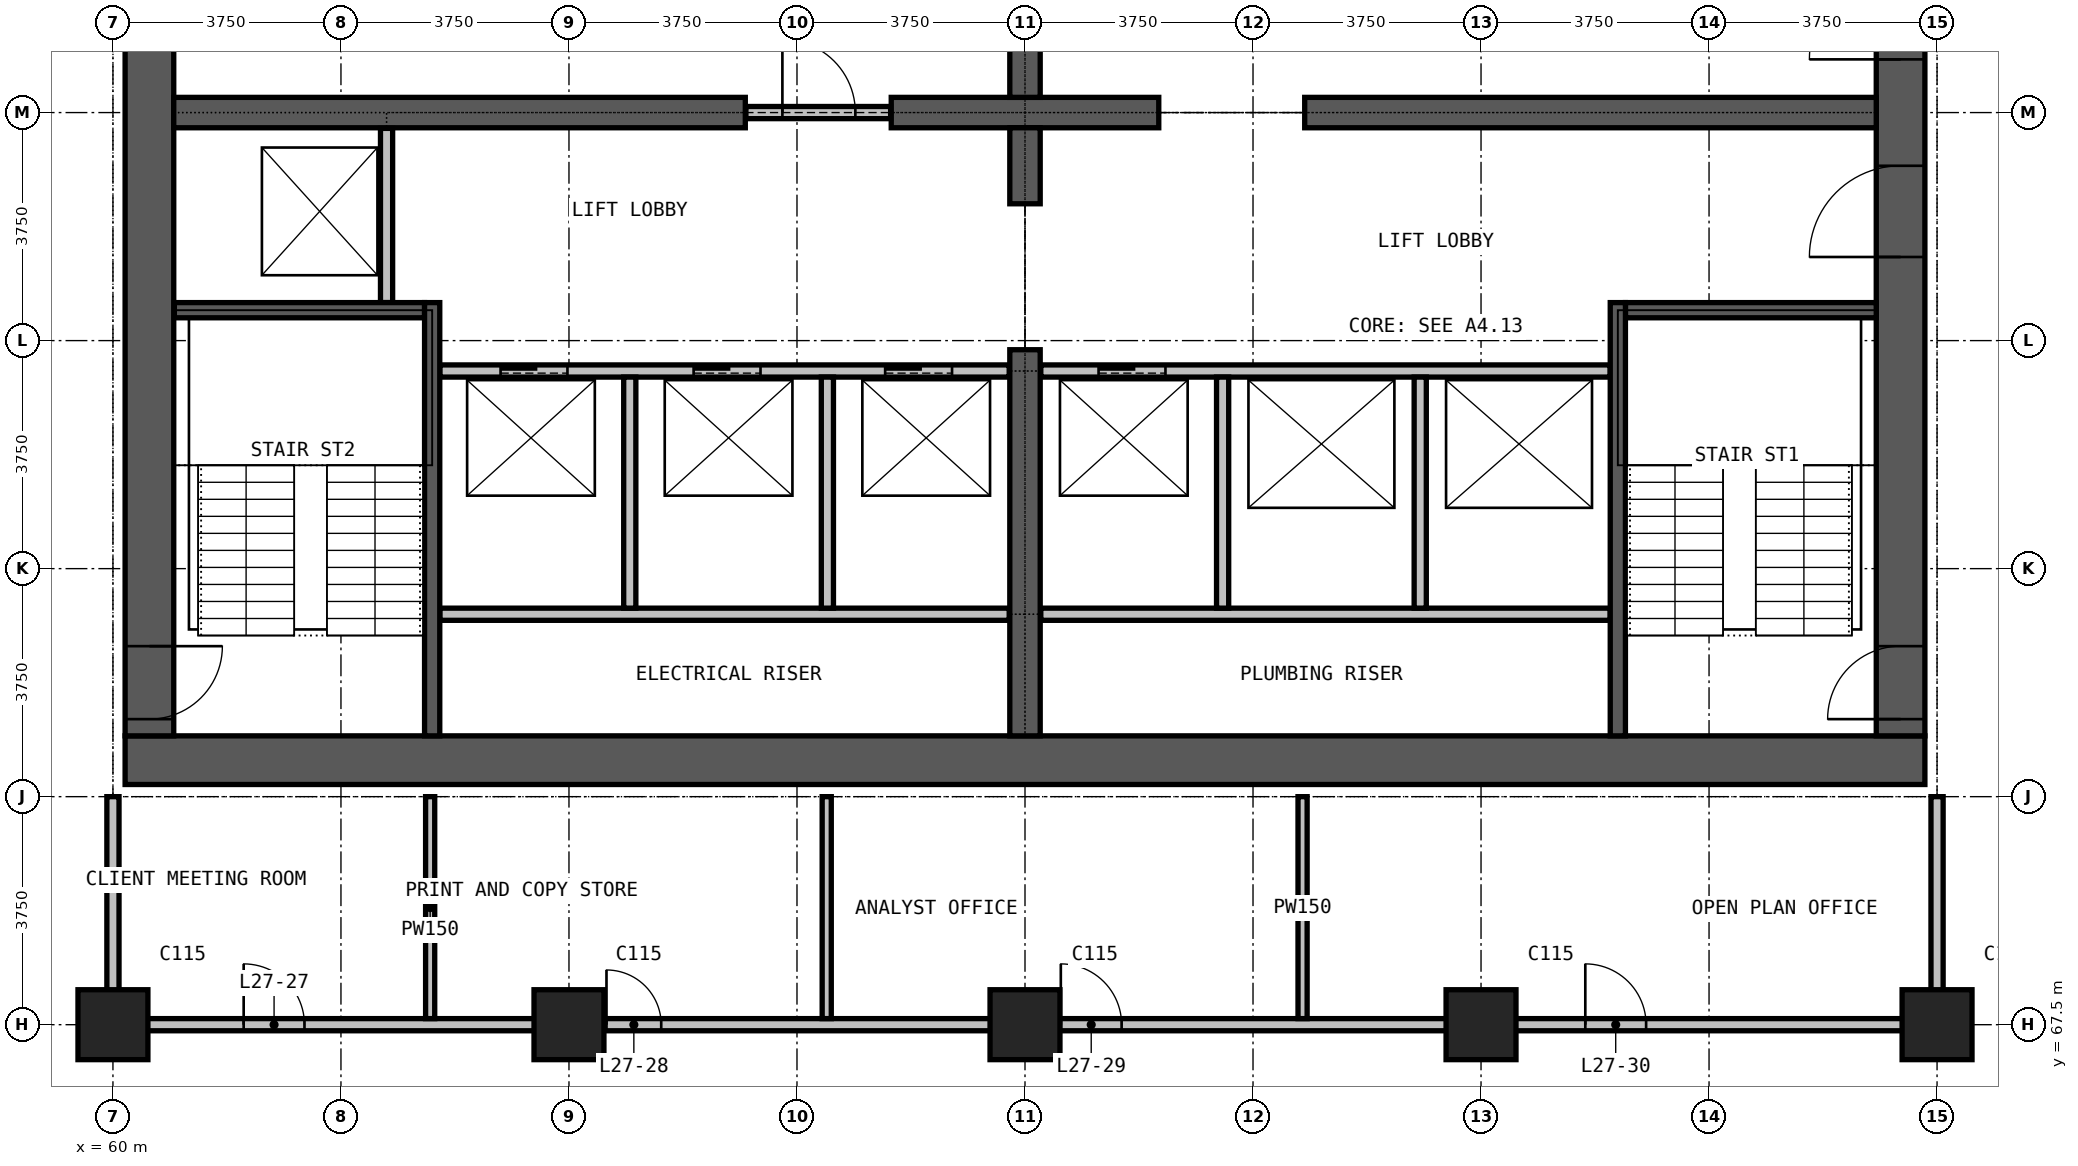
"""IFC4 building model, lengths in metres.
Left out: names, types, materials, properties, quantities, classifications, styles, units other than length and angle.
Written with IfcOpenShell. Run it as: python <this file> out.ifc"""

import sys

from ifc_helpers import new_model, si_unit, direction, frame, frame_2d, origin, origin_2d, place, context, subcontext, project, spatial, rectangle, extrude, element, fill, save


model = new_model("IFC4")
c1 = context("Model", 3, precision=1e-05, world=origin(), true_north=direction((0.0, 1.0)))
c2 = subcontext(c1, "Body", "Model", "MODEL_VIEW")
j1 = project(units=[si_unit("LENGTHUNIT", "METRE"), si_unit("PLANEANGLEUNIT", "RADIAN")], contexts=[c1])
p1 = place(None, origin())
s1 = spatial("IfcSite", under=j1, at=p1, CompositionType="ELEMENT")
p2 = place(p1, origin())
s2 = spatial("IfcBuilding", under=s1, at=p2, CompositionType="ELEMENT")
p3 = place(p2, frame((0.0, 0.0, 110.8)))
s3 = spatial("IfcBuildingStorey", under=s2, at=p3, CompositionType="ELEMENT", Elevation=110.8)
for number, where, z_axis, x_axis in (
    (1, (60.0, 67.5, 0.0), (0.0, 0.0, 1.0), (1.0, 0.0, 0.0)),
    (2, (67.5, 67.5, 0.0), (0.0, 0.0, 1.0), (1.0, 0.0, 0.0)),
    (3, (75.0, 67.5, 0.0), (0.0, 0.0, 1.0), (1.0, 0.0, 0.0)),
    (4, (82.5, 67.5, 0.0), (0.0, 0.0, 1.0), (1.0, 0.0, 0.0)),
    (5, (90.0, 67.5, 0.0), (0.0, 0.0, 1.0), (1.0, 0.0, 0.0)),
):
    element("IfcColumn", number, at=place(p3, frame(where, z_axis=z_axis, x_axis=x_axis)), inside=s3, PredefinedType="COLUMN", context=c2, shape_type="SweptSolid", body=[
        extrude(rectangle(XDim=1.15, YDim=1.15, at=origin_2d()), origin(), (0.0, 0.0, 1.0), 3.6),
    ])
p4 = place(p3, frame((60.2, 71.85, 0.0), z_axis=(0.0, 0.0, 1.0), x_axis=(1.0, 0.0, 0.0)))
e6 = element("IfcWall", 6, at=p4, inside=s3, PredefinedType="SHEAR", context=c2, shape_type="SweptSolid", body=[
    extrude(rectangle(XDim=29.6, YDim=0.8, at=frame_2d((14.8, 0.0))), origin(), (0.0, 0.0, 1.0), 3.6),
])
p5 = place(p3, frame((89.4, 72.25, 0.0), z_axis=(0.0, 0.0, 1.0), x_axis=(0.0, 1.0, 0.0)))
e7 = element("IfcWall", 7, at=p5, inside=s3, PredefinedType="SHEAR", context=c2, shape_type="SweptSolid", body=[
    extrude(rectangle(XDim=20.5, YDim=0.8, at=frame_2d((10.25, 0.0))), origin(), (0.0, 0.0, 1.0), 3.6),
])
p6 = place(p5, frame((0.275, 0.0, 0.0)))
e8 = element("IfcOpeningElement", 8, at=p6, cuts=e7, PredefinedType="OPENING", context=c2, shape_type="SweptSolid", body=[
    extrude(rectangle(XDim=1.2, YDim=2.2, at=frame_2d((0.6, 1.1))), frame((0.0, 0.41, 0.0), z_axis=(0.0, -1.0, 0.0), x_axis=(1.0, 0.0, 0.0)), (0.0, 0.0, 1.0), 0.82),
])
p7 = place(p5, frame((13.775, 0.0, 0.0)))
e9 = element("IfcOpeningElement", 9, at=p7, cuts=e7, PredefinedType="OPENING", context=c2, shape_type="SweptSolid", body=[
    extrude(rectangle(XDim=1.2, YDim=2.2, at=frame_2d((0.6, 1.1))), frame((0.0, 0.41, 0.0), z_axis=(0.0, -1.0, 0.0), x_axis=(1.0, 0.0, 0.0)), (0.0, 0.0, 1.0), 0.82),
])
p8 = place(p5, frame((7.875, 0.0, 0.0)))
e10 = element("IfcOpeningElement", 10, at=p8, cuts=e7, PredefinedType="OPENING", context=c2, shape_type="SweptSolid", body=[
    extrude(rectangle(XDim=1.5, YDim=2.2, at=frame_2d((0.75, 1.1))), frame((0.0, 0.41, 0.0), z_axis=(0.0, -1.0, 0.0), x_axis=(1.0, 0.0, 0.0)), (0.0, 0.0, 1.0), 0.82),
])
p9 = place(p5, frame((11.125, 0.0, 0.0)))
e11 = element("IfcOpeningElement", 11, at=p9, cuts=e7, PredefinedType="OPENING", context=c2, shape_type="SweptSolid", body=[
    extrude(rectangle(XDim=1.5, YDim=2.2, at=frame_2d((0.75, 1.1))), frame((0.0, 0.41, 0.0), z_axis=(0.0, -1.0, 0.0), x_axis=(1.0, 0.0, 0.0)), (0.0, 0.0, 1.0), 0.82),
])
p10 = place(p3, frame((60.6, 92.75, 0.0), z_axis=(0.0, 0.0, 1.0), x_axis=(0.0, -1.0, 0.0)))
e12 = element("IfcWall", 12, at=p10, inside=s3, PredefinedType="SHEAR", context=c2, shape_type="SweptSolid", body=[
    extrude(rectangle(XDim=20.5, YDim=0.8, at=frame_2d((10.25, 0.0))), origin(), (0.0, 0.0, 1.0), 3.6),
])
p11 = place(p10, frame((19.025, 0.0, 0.0)))
e13 = element("IfcOpeningElement", 13, at=p11, cuts=e12, PredefinedType="OPENING", context=c2, shape_type="SweptSolid", body=[
    extrude(rectangle(XDim=1.2, YDim=2.2, at=frame_2d((0.6, 1.1))), frame((0.0, 0.41, 0.0), z_axis=(0.0, -1.0, 0.0), x_axis=(1.0, 0.0, 0.0)), (0.0, 0.0, 1.0), 0.82),
])
p12 = place(p10, frame((8.025, 0.0, 0.0)))
e14 = element("IfcOpeningElement", 14, at=p12, cuts=e12, PredefinedType="OPENING", context=c2, shape_type="SweptSolid", body=[
    extrude(rectangle(XDim=1.2, YDim=2.2, at=frame_2d((0.6, 1.1))), frame((0.0, 0.41, 0.0), z_axis=(0.0, -1.0, 0.0), x_axis=(1.0, 0.0, 0.0)), (0.0, 0.0, 1.0), 0.82),
])
p13 = place(p3, frame((61.0, 82.5, 0.0), z_axis=(0.0, 0.0, 1.0), x_axis=(1.0, 0.0, 0.0)))
e15 = element("IfcWall", 15, at=p13, inside=s3, PredefinedType="SHEAR", context=c2, shape_type="SweptSolid", body=[
    extrude(rectangle(XDim=9.4, YDim=0.5, at=frame_2d((4.7, 0.0))), origin(), (0.0, 0.0, 1.0), 3.6),
])
p14 = place(p3, frame((72.8, 82.5, 0.0), z_axis=(0.0, 0.0, 1.0), x_axis=(1.0, 0.0, 0.0)))
e16 = element("IfcWall", 16, at=p14, inside=s3, PredefinedType="SHEAR", context=c2, shape_type="SweptSolid", body=[
    extrude(rectangle(XDim=4.4, YDim=0.5, at=frame_2d((2.2, 0.0))), origin(), (0.0, 0.0, 1.0), 3.6),
])
p15 = place(p3, frame((79.6, 82.5, 0.0), z_axis=(0.0, 0.0, 1.0), x_axis=(1.0, 0.0, 0.0)))
e17 = element("IfcWall", 17, at=p15, inside=s3, PredefinedType="SHEAR", context=c2, shape_type="SweptSolid", body=[
    extrude(rectangle(XDim=9.4, YDim=0.5, at=frame_2d((4.7, 0.0))), origin(), (0.0, 0.0, 1.0), 3.6),
])
p16 = place(p3, frame((75.0, 72.25, 0.0), z_axis=(0.0, 0.0, 1.0), x_axis=(0.0, 1.0, 0.0)))
e18 = element("IfcWall", 18, at=p16, inside=s3, PredefinedType="SHEAR", context=c2, shape_type="SweptSolid", body=[
    extrude(rectangle(XDim=6.35, YDim=0.5, at=frame_2d((3.175, 0.0))), origin(), (0.0, 0.0, 1.0), 3.6),
])
for number, where, z_axis, x_axis in (
    (19, (75.0, 81.0, 0.0), (0.0, 0.0, 1.0), (0.0, 1.0, 0.0)),
    (20, (75.0, 82.75, 0.0), (0.0, 0.0, 1.0), (0.0, 1.0, 0.0)),
):
    element("IfcWall", number, at=place(p3, frame(where, z_axis=z_axis, x_axis=x_axis)), inside=s3, PredefinedType="SHEAR", context=c2, shape_type="SweptSolid", body=[
        extrude(rectangle(XDim=1.25, YDim=0.5, at=frame_2d((0.625, 0.0))), origin(), (0.0, 0.0, 1.0), 3.6),
    ])
p17 = place(p3, frame((70.41, 82.5, 0.0), z_axis=(0.0, 0.0, 1.0), x_axis=(1.0, 0.0, 0.0)))
e21 = element("IfcWall", 21, at=p17, inside=s3, PredefinedType="PARTITIONING", context=c2, shape_type="SweptSolid", body=[
    extrude(rectangle(XDim=2.38, YDim=0.2, at=frame_2d((1.19, 0.0))), origin(), (0.0, 0.0, 1.0), 2.4),
])
p18 = place(p17, frame((0.6, 0.0, 0.0)))
e22 = element("IfcOpeningElement", 22, at=p18, cuts=e21, PredefinedType="OPENING", context=c2, shape_type="SweptSolid", body=[
    extrude(rectangle(XDim=1.2, YDim=2.2, at=frame_2d((0.6, 1.1))), frame((0.0, 0.11, 0.0), z_axis=(0.0, -1.0, 0.0), x_axis=(1.0, 0.0, 0.0)), (0.0, 0.0, 1.0), 0.22),
])
p19 = place(p3, frame((60.1, 67.5, 0.0), z_axis=(0.0, 0.0, 1.0), x_axis=(1.0, 0.0, 0.0)))
e23 = element("IfcWall", 23, at=p19, inside=s3, PredefinedType="PARTITIONING", context=c2, shape_type="SweptSolid", body=[
    extrude(rectangle(XDim=29.8, YDim=0.2, at=frame_2d((14.9, 0.0))), origin(), (0.0, 0.0, 1.0), 3.3),
])
p20 = place(p19, frame((2.05, 0.0, 0.0)))
e24 = element("IfcOpeningElement", 24, at=p20, cuts=e23, PredefinedType="OPENING", context=c2, shape_type="SweptSolid", body=[
    extrude(rectangle(XDim=1.0, YDim=2.2, at=frame_2d((0.5, 1.1))), frame((0.0, 0.11, 0.0), z_axis=(0.0, -1.0, 0.0), x_axis=(1.0, 0.0, 0.0)), (0.0, 0.0, 1.0), 0.22),
])
p21 = place(p19, frame((8.017, 0.0, 0.0)))
e25 = element("IfcOpeningElement", 25, at=p21, cuts=e23, PredefinedType="OPENING", context=c2, shape_type="SweptSolid", body=[
    extrude(rectangle(XDim=0.9, YDim=2.2, at=frame_2d((0.45, 1.1))), frame((0.0, 0.11, 0.0), z_axis=(0.0, -1.0, 0.0), x_axis=(1.0, 0.0, 0.0)), (0.0, 0.0, 1.0), 0.22),
])
p22 = place(p19, frame((15.489, 0.0, 0.0)))
e26 = element("IfcOpeningElement", 26, at=p22, cuts=e23, PredefinedType="OPENING", context=c2, shape_type="SweptSolid", body=[
    extrude(rectangle(XDim=1.0, YDim=2.2, at=frame_2d((0.5, 1.1))), frame((0.0, 0.11, 0.0), z_axis=(0.0, -1.0, 0.0), x_axis=(1.0, 0.0, 0.0)), (0.0, 0.0, 1.0), 0.22),
])
p23 = place(p19, frame((24.115, 0.0, 0.0)))
e27 = element("IfcOpeningElement", 27, at=p23, cuts=e23, PredefinedType="OPENING", context=c2, shape_type="SweptSolid", body=[
    extrude(rectangle(XDim=1.0, YDim=2.2, at=frame_2d((0.5, 1.1))), frame((0.0, 0.11, 0.0), z_axis=(0.0, -1.0, 0.0), x_axis=(1.0, 0.0, 0.0)), (0.0, 0.0, 1.0), 0.22),
])
for number, where, z_axis, x_axis in (
    (28, (60.0, 67.4, 0.0), (0.0, 0.0, 1.0), (0.0, 1.0, 0.0)),
    (29, (90.0, 67.4, 0.0), (0.0, 0.0, 1.0), (0.0, 1.0, 0.0)),
):
    element("IfcWall", number, at=place(p3, frame(where, z_axis=z_axis, x_axis=x_axis)), inside=s3, PredefinedType="PARTITIONING", context=c2, shape_type="SweptSolid", body=[
        extrude(rectangle(XDim=3.85, YDim=0.2, at=frame_2d((1.925, 0.0))), origin(), (0.0, 0.0, 1.0), 3.3),
    ])
for number, where, z_axis, x_axis in (
    (30, (65.217, 67.6, 0.0), (0.0, 0.0, 1.0), (0.0, 1.0, 0.0)),
    (31, (71.739, 67.6, 0.0), (0.0, 0.0, 1.0), (0.0, 1.0, 0.0)),
    (32, (79.565, 67.6, 0.0), (0.0, 0.0, 1.0), (0.0, 1.0, 0.0)),
):
    element("IfcWall", number, at=place(p3, frame(where, z_axis=z_axis, x_axis=x_axis)), inside=s3, PredefinedType="PARTITIONING", context=c2, shape_type="SweptSolid", body=[
        extrude(rectangle(XDim=3.65, YDim=0.15, at=frame_2d((1.825, 0.0))), origin(), (0.0, 0.0, 1.0), 3.3),
    ])
for number, where, z_axis, x_axis in (
    (33, (65.375, 74.25, 0.0), (0.0, 0.0, 1.0), (1.0, 0.0, 0.0)),
    (34, (75.26, 74.25, 0.0), (0.0, 0.0, 1.0), (1.0, 0.0, 0.0)),
):
    element("IfcWall", number, at=place(p3, frame(where, z_axis=z_axis, x_axis=x_axis)), inside=s3, PredefinedType="PARTITIONING", context=c2, shape_type="SweptSolid", body=[
        extrude(rectangle(XDim=9.365, YDim=0.2, at=frame_2d((4.683, 0.0))), origin(), (0.0, 0.0, 1.0), 3.3),
    ])
p24 = place(p3, frame((65.375, 78.25, 0.0), z_axis=(0.0, 0.0, 1.0), x_axis=(1.0, 0.0, 0.0)))
e35 = element("IfcWall", 35, at=p24, inside=s3, PredefinedType="PARTITIONING", context=c2, shape_type="SweptSolid", body=[
    extrude(rectangle(XDim=9.365, YDim=0.2, at=frame_2d((4.683, 0.0))), origin(), (0.0, 0.0, 1.0), 3.3),
])
p25 = place(p24, frame((1.0, 0.0, 0.0)))
e36 = element("IfcOpeningElement", 36, at=p25, cuts=e35, PredefinedType="OPENING", context=c2, shape_type="SweptSolid", body=[
    extrude(rectangle(XDim=1.1, YDim=2.2, at=frame_2d((0.55, 1.1))), frame((0.0, 0.11, 0.0), z_axis=(0.0, -1.0, 0.0), x_axis=(1.0, 0.0, 0.0)), (0.0, 0.0, 1.0), 0.22),
])
p26 = place(p24, frame((4.175, 0.0, 0.0)))
e37 = element("IfcOpeningElement", 37, at=p26, cuts=e35, PredefinedType="OPENING", context=c2, shape_type="SweptSolid", body=[
    extrude(rectangle(XDim=1.1, YDim=2.2, at=frame_2d((0.55, 1.1))), frame((0.0, 0.11, 0.0), z_axis=(0.0, -1.0, 0.0), x_axis=(1.0, 0.0, 0.0)), (0.0, 0.0, 1.0), 0.22),
])
p27 = place(p24, frame((7.325, 0.0, 0.0)))
e38 = element("IfcOpeningElement", 38, at=p27, cuts=e35, PredefinedType="OPENING", context=c2, shape_type="SweptSolid", body=[
    extrude(rectangle(XDim=1.1, YDim=2.2, at=frame_2d((0.55, 1.1))), frame((0.0, 0.11, 0.0), z_axis=(0.0, -1.0, 0.0), x_axis=(1.0, 0.0, 0.0)), (0.0, 0.0, 1.0), 0.22),
])
p28 = place(p3, frame((75.26, 78.25, 0.0), z_axis=(0.0, 0.0, 1.0), x_axis=(1.0, 0.0, 0.0)))
e39 = element("IfcWall", 39, at=p28, inside=s3, PredefinedType="PARTITIONING", context=c2, shape_type="SweptSolid", body=[
    extrude(rectangle(XDim=9.365, YDim=0.2, at=frame_2d((4.683, 0.0))), origin(), (0.0, 0.0, 1.0), 3.3),
])
p29 = place(p28, frame((0.95, 0.0, 0.0)))
e40 = element("IfcOpeningElement", 40, at=p29, cuts=e39, PredefinedType="OPENING", context=c2, shape_type="SweptSolid", body=[
    extrude(rectangle(XDim=1.1, YDim=2.2, at=frame_2d((0.55, 1.1))), frame((0.0, 0.11, 0.0), z_axis=(0.0, -1.0, 0.0), x_axis=(1.0, 0.0, 0.0)), (0.0, 0.0, 1.0), 0.22),
])
p30 = place(p3, frame((64.5, 79.375, 0.0), z_axis=(0.0, 0.0, 1.0), x_axis=(0.0, 1.0, 0.0)))
e41 = element("IfcWall", 41, at=p30, inside=s3, PredefinedType="PARTITIONING", context=c2, shape_type="SweptSolid", body=[
    extrude(rectangle(XDim=2.865, YDim=0.2, at=frame_2d((1.433, 0.0))), origin(), (0.0, 0.0, 1.0), 3.3),
])
for number, where, z_axis, x_axis in (
    (42, (68.5, 74.35, 0.0), (0.0, 0.0, 1.0), (0.0, 1.0, 0.0)),
    (43, (71.75, 74.35, 0.0), (0.0, 0.0, 1.0), (0.0, 1.0, 0.0)),
    (44, (78.25, 74.35, 0.0), (0.0, 0.0, 1.0), (0.0, 1.0, 0.0)),
    (45, (81.5, 74.35, 0.0), (0.0, 0.0, 1.0), (0.0, 1.0, 0.0)),
):
    element("IfcWall", number, at=place(p3, frame(where, z_axis=z_axis, x_axis=x_axis)), inside=s3, PredefinedType="PARTITIONING", context=c2, shape_type="SweptSolid", body=[
        extrude(rectangle(XDim=3.8, YDim=0.2, at=frame_2d((1.9, 0.0))), origin(), (0.0, 0.0, 1.0), 3.3),
    ])
p31 = place(p3, frame((61.01, 79.25, 0.0), z_axis=(0.0, 0.0, 1.0), x_axis=(1.0, 0.0, 0.0)))
e46 = element("IfcWall", 46, at=p31, inside=s3, PredefinedType="PARTITIONING", context=c2, shape_type="SweptSolid", body=[
    extrude(rectangle(XDim=4.115, YDim=0.25, at=frame_2d((2.058, 0.0))), origin(), (0.0, 0.0, 1.0), 3.3),
])
p32 = place(p3, frame((84.875, 79.25, 0.0), z_axis=(0.0, 0.0, 1.0), x_axis=(1.0, 0.0, 0.0)))
e47 = element("IfcWall", 47, at=p32, inside=s3, PredefinedType="PARTITIONING", context=c2, shape_type="SweptSolid", body=[
    extrude(rectangle(XDim=4.125, YDim=0.25, at=frame_2d((2.062, 0.0))), origin(), (0.0, 0.0, 1.0), 3.3),
])
for number, where, z_axis, x_axis in (
    (48, (65.25, 72.25, 0.0), (0.0, 0.0, 1.0), (0.0, 1.0, 0.0)),
    (49, (84.75, 72.25, 0.0), (0.0, 0.0, 1.0), (0.0, 1.0, 0.0)),
):
    element("IfcWall", number, at=place(p3, frame(where, z_axis=z_axis, x_axis=x_axis)), inside=s3, PredefinedType="PARTITIONING", context=c2, shape_type="SweptSolid", body=[
        extrude(rectangle(XDim=7.125, YDim=0.25, at=frame_2d((3.562, 0.0))), origin(), (0.0, 0.0, 1.0), 3.3),
    ])
p33 = place(p25, origin())
e50 = element("IfcDoor", 50, at=p33, inside=s3, OperationType="DOUBLE_DOOR_SLIDING", PredefinedType="DOOR", context=c2, shape_type="SweptSolid", body=[
    extrude(rectangle(XDim=1.1, YDim=2.2, at=frame_2d((0.55, 1.1))), frame((0.0, 0.025, 0.0), z_axis=(0.0, -1.0, 0.0), x_axis=(1.0, 0.0, 0.0)), (0.0, 0.0, 1.0), 0.05),
])
fill(e36, e50)
p34 = place(p26, origin())
e51 = element("IfcDoor", 51, at=p34, inside=s3, OperationType="DOUBLE_DOOR_SLIDING", PredefinedType="DOOR", context=c2, shape_type="SweptSolid", body=[
    extrude(rectangle(XDim=1.1, YDim=2.2, at=frame_2d((0.55, 1.1))), frame((0.0, 0.025, 0.0), z_axis=(0.0, -1.0, 0.0), x_axis=(1.0, 0.0, 0.0)), (0.0, 0.0, 1.0), 0.05),
])
fill(e37, e51)
p35 = place(p27, origin())
e52 = element("IfcDoor", 52, at=p35, inside=s3, OperationType="DOUBLE_DOOR_SLIDING", PredefinedType="DOOR", context=c2, shape_type="SweptSolid", body=[
    extrude(rectangle(XDim=1.1, YDim=2.2, at=frame_2d((0.55, 1.1))), frame((0.0, 0.025, 0.0), z_axis=(0.0, -1.0, 0.0), x_axis=(1.0, 0.0, 0.0)), (0.0, 0.0, 1.0), 0.05),
])
fill(e38, e52)
p36 = place(p29, origin())
e53 = element("IfcDoor", 53, at=p36, inside=s3, OperationType="DOUBLE_DOOR_SLIDING", PredefinedType="DOOR", context=c2, shape_type="SweptSolid", body=[
    extrude(rectangle(XDim=1.1, YDim=2.2, at=frame_2d((0.55, 1.1))), frame((0.0, 0.025, 0.0), z_axis=(0.0, -1.0, 0.0), x_axis=(1.0, 0.0, 0.0)), (0.0, 0.0, 1.0), 0.05),
])
fill(e40, e53)
p37 = place(p18, origin())
e54 = element("IfcDoor", 54, at=p37, inside=s3, OperationType="SINGLE_SWING_RIGHT", PredefinedType="DOOR", context=c2, shape_type="SweptSolid", body=[
    extrude(rectangle(XDim=1.2, YDim=2.2, at=frame_2d((0.6, 1.1))), frame((0.0, 0.025, 0.0), z_axis=(0.0, -1.0, 0.0), x_axis=(1.0, 0.0, 0.0)), (0.0, 0.0, 1.0), 0.05),
])
fill(e22, e54)
p38 = place(p6, origin())
e55 = element("IfcDoor", 55, at=p38, inside=s3, OperationType="SINGLE_SWING_LEFT", PredefinedType="DOOR", context=c2, shape_type="SweptSolid", body=[
    extrude(rectangle(XDim=1.2, YDim=2.2, at=frame_2d((0.6, 1.1))), frame((0.0, 0.025, 0.0), z_axis=(0.0, -1.0, 0.0), x_axis=(1.0, 0.0, 0.0)), (0.0, 0.0, 1.0), 0.05),
])
fill(e8, e55)
p39 = place(p11, origin())
e56 = element("IfcDoor", 56, at=p39, inside=s3, OperationType="SINGLE_SWING_LEFT", PredefinedType="DOOR", context=c2, shape_type="SweptSolid", body=[
    extrude(rectangle(XDim=1.2, YDim=2.2, at=frame_2d((0.6, 1.1))), frame((0.0, 0.025, 0.0), z_axis=(0.0, -1.0, 0.0), x_axis=(1.0, 0.0, 0.0)), (0.0, 0.0, 1.0), 0.05),
])
fill(e13, e56)
p40 = place(p8, origin())
e57 = element("IfcDoor", 57, at=p40, inside=s3, OperationType="DOUBLE_DOOR_SINGLE_SWING", PredefinedType="DOOR", context=c2, shape_type="SweptSolid", body=[
    extrude(rectangle(XDim=1.5, YDim=2.2, at=frame_2d((0.75, 1.1))), frame((0.0, 0.025, 0.0), z_axis=(0.0, -1.0, 0.0), x_axis=(1.0, 0.0, 0.0)), (0.0, 0.0, 1.0), 0.05),
])
fill(e10, e57)
p41 = place(p9, origin())
e58 = element("IfcDoor", 58, at=p41, inside=s3, OperationType="DOUBLE_DOOR_SINGLE_SWING", PredefinedType="DOOR", context=c2, shape_type="SweptSolid", body=[
    extrude(rectangle(XDim=1.5, YDim=2.2, at=frame_2d((0.75, 1.1))), frame((0.0, 0.025, 0.0), z_axis=(0.0, -1.0, 0.0), x_axis=(1.0, 0.0, 0.0)), (0.0, 0.0, 1.0), 0.05),
])
fill(e11, e58)
p42 = place(p20, origin())
e59 = element("IfcDoor", 59, at=p42, inside=s3, OperationType="SINGLE_SWING_LEFT", PredefinedType="DOOR", context=c2, shape_type="SweptSolid", body=[
    extrude(rectangle(XDim=1.0, YDim=2.2, at=frame_2d((0.5, 1.1))), frame((0.0, 0.025, 0.0), z_axis=(0.0, -1.0, 0.0), x_axis=(1.0, 0.0, 0.0)), (0.0, 0.0, 1.0), 0.05),
])
fill(e24, e59)
p43 = place(p21, origin())
e60 = element("IfcDoor", 60, at=p43, inside=s3, OperationType="SINGLE_SWING_LEFT", PredefinedType="DOOR", context=c2, shape_type="SweptSolid", body=[
    extrude(rectangle(XDim=0.9, YDim=2.2, at=frame_2d((0.45, 1.1))), frame((0.0, 0.025, 0.0), z_axis=(0.0, -1.0, 0.0), x_axis=(1.0, 0.0, 0.0)), (0.0, 0.0, 1.0), 0.05),
])
fill(e25, e60)
p44 = place(p22, origin())
e61 = element("IfcDoor", 61, at=p44, inside=s3, OperationType="SINGLE_SWING_LEFT", PredefinedType="DOOR", context=c2, shape_type="SweptSolid", body=[
    extrude(rectangle(XDim=1.0, YDim=2.2, at=frame_2d((0.5, 1.1))), frame((0.0, 0.025, 0.0), z_axis=(0.0, -1.0, 0.0), x_axis=(1.0, 0.0, 0.0)), (0.0, 0.0, 1.0), 0.05),
])
fill(e26, e61)
p45 = place(p23, origin())
e62 = element("IfcDoor", 62, at=p45, inside=s3, OperationType="SINGLE_SWING_LEFT", PredefinedType="DOOR", context=c2, shape_type="SweptSolid", body=[
    extrude(rectangle(XDim=1.0, YDim=2.2, at=frame_2d((0.5, 1.1))), frame((0.0, 0.025, 0.0), z_axis=(0.0, -1.0, 0.0), x_axis=(1.0, 0.0, 0.0)), (0.0, 0.0, 1.0), 0.05),
])
fill(e27, e62)
save(model, sys.argv[1])
